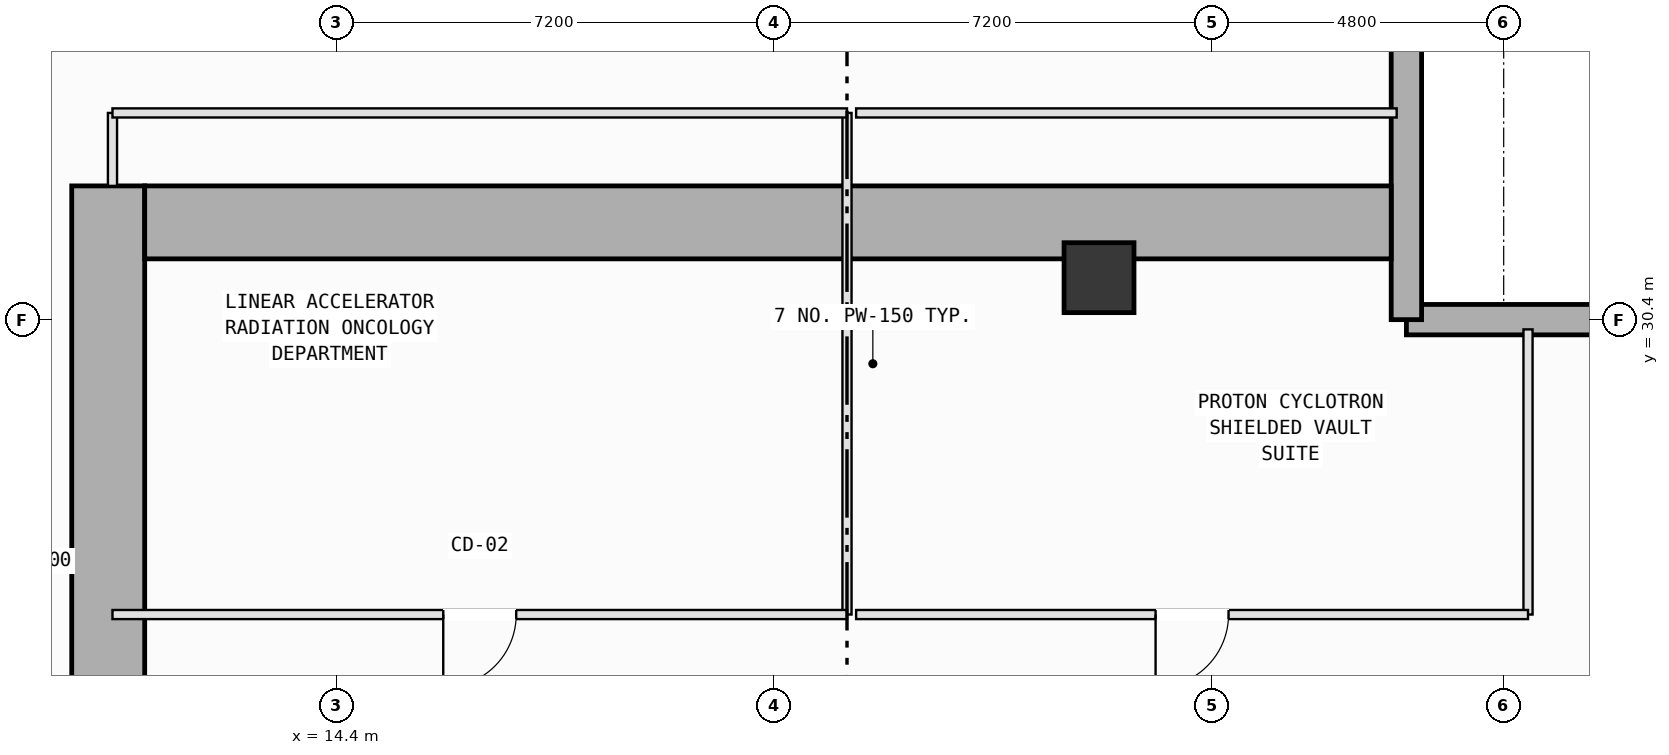
"""IFC4 building model, lengths in metres.
Left out: names, types, materials, properties, quantities, classifications, styles, units other than length and angle.
Written with IfcOpenShell. Run it as: python <this file> out.ifc"""

import sys

from ifc_helpers import new_model, si_unit, direction, frame, frame_2d, origin, origin_2d, place, context, subcontext, project, spatial, rectangle, extrude, element, fill, save


model = new_model("IFC4")
c1 = context("Model", 3, precision=1e-05, world=origin(), true_north=direction((0.0, 1.0)))
c2 = subcontext(c1, "Body", "Model", "MODEL_VIEW")
j1 = project(units=[si_unit("LENGTHUNIT", "METRE"), si_unit("PLANEANGLEUNIT", "RADIAN")], contexts=[c1])
p1 = place(None, origin())
s1 = spatial("IfcSite", under=j1, at=p1, CompositionType="ELEMENT")
p2 = place(p1, origin())
s2 = spatial("IfcBuilding", under=s1, at=p2, CompositionType="ELEMENT")
p3 = place(p2, frame((0.0, 0.0, -9.6)))
s3 = spatial("IfcBuildingStorey", under=s2, at=p3, CompositionType="ELEMENT", Elevation=-9.6)
p4 = place(p3, frame((26.945, 31.091, 0.0), z_axis=(0.0, 0.0, 1.0), x_axis=(1.0, 0.0, 0.0)))
e1 = element("IfcColumn", 1, at=p4, inside=s3, PredefinedType="COLUMN", context=c2, shape_type="SweptSolid", body=[
    extrude(rectangle(XDim=1.15, YDim=1.15, at=origin_2d()), origin(), (0.0, 0.0, 1.0), 4.8),
])
p5 = place(p3, frame((32.0, 30.4, 0.0), z_axis=(0.0, 0.0, 1.0), x_axis=(1.0, 0.0, 0.0)))
e2 = element("IfcWall", 2, at=p5, inside=s3, PredefinedType="USERDEFINED", context=c2, shape_type="SweptSolid", body=[
    extrude(rectangle(XDim=49.3, YDim=0.5, at=frame_2d((24.65, 0.0))), origin(), (0.0, 0.0, 1.0), 4.55),
])
p6 = place(p3, frame((32.0, 30.4, 0.0), z_axis=(0.0, 0.0, 1.0), x_axis=(0.0, 1.0, 0.0)))
e3 = element("IfcWall", 3, at=p6, inside=s3, PredefinedType="USERDEFINED", context=c2, shape_type="SweptSolid", body=[
    extrude(rectangle(XDim=19.3, YDim=0.5, at=frame_2d((9.65, 0.0))), origin(), (0.0, 0.0, 1.0), 4.55),
])
p7 = place(p3, frame((10.65, 20.25, 0.0), z_axis=(0.0, 0.0, 1.0), x_axis=(0.0, 1.0, 0.0)))
e4 = element("IfcWall", 4, at=p7, inside=s3, PredefinedType="SOLIDWALL", context=c2, shape_type="SweptSolid", body=[
    extrude(rectangle(XDim=12.35, YDim=1.2, at=frame_2d((6.175, 0.0))), origin(), (0.0, 0.0, 1.0), 4.55),
])
p8 = place(p3, frame((11.25, 32.0, 0.0), z_axis=(0.0, 0.0, 1.0), x_axis=(1.0, 0.0, 0.0)))
e5 = element("IfcWall", 5, at=p8, inside=s3, PredefinedType="SOLIDWALL", context=c2, shape_type="SweptSolid", body=[
    extrude(rectangle(XDim=20.5, YDim=1.2, at=frame_2d((10.25, 0.0))), origin(), (0.0, 0.0, 1.0), 4.55),
])
p9 = place(p3, frame((22.8, 33.8, 0.0), z_axis=(0.0, 0.0, 1.0), x_axis=(0.0, -1.0, 0.0)))
e6 = element("IfcWall", 6, at=p9, inside=s3, PredefinedType="PARTITIONING", context=c2, shape_type="SweptSolid", body=[
    extrude(rectangle(XDim=8.25, YDim=0.15, at=frame_2d((4.125, 0.0))), origin(), (0.0, 0.0, 1.0), 4.55),
])
p10 = place(p3, frame((22.8, 25.55, 0.0), z_axis=(0.0, 0.0, 1.0), x_axis=(-1.0, 0.0, 0.0)))
e7 = element("IfcWall", 7, at=p10, inside=s3, PredefinedType="PARTITIONING", context=c2, shape_type="SweptSolid", body=[
    extrude(rectangle(XDim=12.08, YDim=0.15, at=frame_2d((6.04, 0.0))), origin(), (0.0, 0.0, 1.0), 4.55),
])
p11 = place(p10, frame((5.44, 0.0, 0.0)))
e8 = element("IfcOpeningElement", 8, at=p11, cuts=e7, PredefinedType="OPENING", context=c2, shape_type="SweptSolid", body=[
    extrude(rectangle(XDim=1.2, YDim=2.15, at=frame_2d((0.6, 1.075))), frame((0.0, 0.085, 0.0), z_axis=(0.0, -1.0, 0.0), x_axis=(1.0, 0.0, 0.0)), (0.0, 0.0, 1.0), 0.17),
])
p12 = place(p3, frame((10.72, 32.6, 0.0), z_axis=(0.0, 0.0, 1.0), x_axis=(0.0, 1.0, 0.0)))
e9 = element("IfcWall", 9, at=p12, inside=s3, PredefinedType="PARTITIONING", context=c2, shape_type="SweptSolid", body=[
    extrude(rectangle(XDim=1.2, YDim=0.15, at=frame_2d((0.6, 0.0))), origin(), (0.0, 0.0, 1.0), 4.55),
])
p13 = place(p3, frame((10.72, 33.8, 0.0), z_axis=(0.0, 0.0, 1.0), x_axis=(1.0, 0.0, 0.0)))
e10 = element("IfcWall", 10, at=p13, inside=s3, PredefinedType="PARTITIONING", context=c2, shape_type="SweptSolid", body=[
    extrude(rectangle(XDim=12.08, YDim=0.15, at=frame_2d((6.04, 0.0))), origin(), (0.0, 0.0, 1.0), 4.55),
])
p14 = place(p3, frame((34.0, 30.24, 0.0), z_axis=(0.0, 0.0, 1.0), x_axis=(0.0, -1.0, 0.0)))
e11 = element("IfcWall", 11, at=p14, inside=s3, PredefinedType="PARTITIONING", context=c2, shape_type="SweptSolid", body=[
    extrude(rectangle(XDim=4.69, YDim=0.15, at=frame_2d((2.345, 0.0))), origin(), (0.0, 0.0, 1.0), 4.55),
])
p15 = place(p3, frame((34.0, 25.55, 0.0), z_axis=(0.0, 0.0, 1.0), x_axis=(-1.0, 0.0, 0.0)))
e12 = element("IfcWall", 12, at=p15, inside=s3, PredefinedType="PARTITIONING", context=c2, shape_type="SweptSolid", body=[
    extrude(rectangle(XDim=11.05, YDim=0.15, at=frame_2d((5.525, 0.0))), origin(), (0.0, 0.0, 1.0), 4.55),
])
p16 = place(p15, frame((4.925, 0.0, 0.0)))
e13 = element("IfcOpeningElement", 13, at=p16, cuts=e12, PredefinedType="OPENING", context=c2, shape_type="SweptSolid", body=[
    extrude(rectangle(XDim=1.2, YDim=2.15, at=frame_2d((0.6, 1.075))), frame((0.0, 0.085, 0.0), z_axis=(0.0, -1.0, 0.0), x_axis=(1.0, 0.0, 0.0)), (0.0, 0.0, 1.0), 0.17),
])
p17 = place(p3, frame((22.95, 33.8, 0.0), z_axis=(0.0, 0.0, 1.0), x_axis=(1.0, 0.0, 0.0)))
e14 = element("IfcWall", 14, at=p17, inside=s3, PredefinedType="PARTITIONING", context=c2, shape_type="SweptSolid", body=[
    extrude(rectangle(XDim=8.89, YDim=0.15, at=frame_2d((4.445, 0.0))), origin(), (0.0, 0.0, 1.0), 4.55),
])
p18 = place(p11, origin())
e15 = element("IfcDoor", 15, at=p18, inside=s3, OperationType="SINGLE_SWING_RIGHT", PredefinedType="DOOR", context=c2, shape_type="SweptSolid", body=[
    extrude(rectangle(XDim=1.2, YDim=2.15, at=frame_2d((0.6, 1.075))), frame((0.0, 0.025, 0.0), z_axis=(0.0, -1.0, 0.0), x_axis=(1.0, 0.0, 0.0)), (0.0, 0.0, 1.0), 0.05),
])
fill(e8, e15)
p19 = place(p16, origin())
e16 = element("IfcDoor", 16, at=p19, inside=s3, OperationType="SINGLE_SWING_RIGHT", PredefinedType="DOOR", context=c2, shape_type="SweptSolid", body=[
    extrude(rectangle(XDim=1.2, YDim=2.15, at=frame_2d((0.6, 1.075))), frame((0.0, 0.025, 0.0), z_axis=(0.0, -1.0, 0.0), x_axis=(1.0, 0.0, 0.0)), (0.0, 0.0, 1.0), 0.05),
])
fill(e13, e16)
save(model, sys.argv[1])
